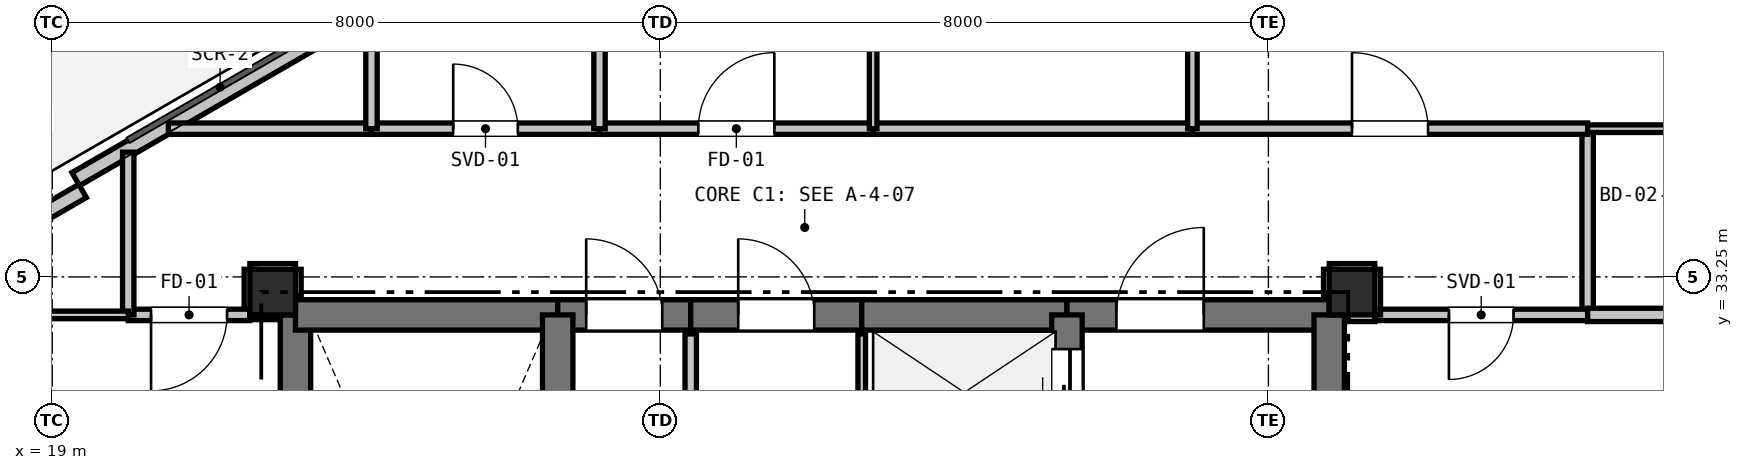
"""IFC4 building model, lengths in metres.
Left out: names, types, materials, properties, quantities, classifications, styles, units other than length and angle.
Written with IfcOpenShell. Run it as: python <this file> out.ifc"""

import sys

from ifc_helpers import new_model, si_unit, direction, frame, frame_2d, origin, origin_2d, place, context, subcontext, project, spatial, rectangle, extrude, element, fill, save


model = new_model("IFC4")
c1 = context("Model", 3, precision=1e-05, world=origin(), true_north=direction((0.0, 1.0)))
c2 = subcontext(c1, "Body", "Model", "MODEL_VIEW")
j1 = project(units=[si_unit("LENGTHUNIT", "METRE"), si_unit("PLANEANGLEUNIT", "RADIAN")], contexts=[c1])
p1 = place(None, origin())
s1 = spatial("IfcSite", under=j1, at=p1, CompositionType="ELEMENT")
p2 = place(p1, origin())
s2 = spatial("IfcBuilding", under=s1, at=p2, CompositionType="ELEMENT")
p3 = place(p2, frame((0.0, 0.0, 211.8)))
s3 = spatial("IfcBuildingStorey", under=s2, at=p3, CompositionType="ELEMENT", Elevation=211.8)
for number, where, z_axis, x_axis in (
    (1, (21.9, 33.05, 0.0), (0.0, 0.0, 1.0), (1.0, 0.0, 0.0)),
    (2, (36.1, 33.05, 0.0), (0.0, 0.0, 1.0), (1.0, 0.0, 0.0)),
):
    element("IfcColumn", number, at=place(p3, frame(where, z_axis=z_axis, x_axis=x_axis)), inside=s3, PredefinedType="COLUMN", context=c2, shape_type="SweptSolid", body=[
        extrude(rectangle(XDim=0.6, YDim=0.6, at=origin_2d()), origin(), (0.0, 0.0, 1.0), 3.3),
    ])
p4 = place(p3, frame((19.309, 34.536, 0.0), z_axis=(0.0, 0.0, 1.0), x_axis=(0.866020680503, 0.500008180874, 0.0)))
e3 = element("IfcWall", 3, at=p4, inside=s3, PredefinedType="PARAPET", context=c2, shape_type="SweptSolid", body=[
    extrude(rectangle(XDim=8.999, YDim=0.2, at=frame_2d((4.5, 0.0))), origin(), (0.0, 0.0, 1.0), 0.2),
])
p5 = place(p3, frame((17.927, 33.53, 0.0), z_axis=(0.0, 0.0, 1.0), x_axis=(0.86605165483, 0.499954529098, 0.0)))
e4 = element("IfcWall", 4, at=p5, inside=s3, PredefinedType="PARAPET", context=c2, shape_type="SweptSolid", body=[
    extrude(rectangle(XDim=1.7, YDim=0.2, at=frame_2d((0.85, 0.0))), origin(), (0.0, 0.0, 1.0), 2.69),
])
p6 = place(p3, frame((22.2, 25.4, 0.0), z_axis=(0.0, 0.0, 1.0), x_axis=(0.0, 1.0, 0.0)))
e5 = element("IfcWall", 5, at=p6, inside=s3, PredefinedType="SHEAR", context=c2, shape_type="SweptSolid", body=[
    extrude(rectangle(XDim=7.35, YDim=0.4, at=frame_2d((3.675, 0.0))), origin(), (0.0, 0.0, 1.0), 3.07),
])
p7 = place(p3, frame((22.2, 32.75, 0.0), z_axis=(0.0, 0.0, 1.0), x_axis=(1.0, 0.0, 0.0)))
e6 = element("IfcWall", 6, at=p7, inside=s3, PredefinedType="SHEAR", context=c2, shape_type="SweptSolid", body=[
    extrude(rectangle(XDim=3.45, YDim=0.4, at=frame_2d((1.725, 0.0))), origin(), (0.0, 0.0, 1.0), 3.07),
])
p8 = place(p3, frame((25.65, 32.75, 0.0), z_axis=(0.0, 0.0, 1.0), x_axis=(1.0, 0.0, 0.0)))
e7 = element("IfcWall", 7, at=p8, inside=s3, PredefinedType="SHEAR", context=c2, shape_type="SweptSolid", body=[
    extrude(rectangle(XDim=1.75, YDim=0.4, at=frame_2d((0.875, 0.0))), origin(), (0.0, 0.0, 1.0), 3.07),
])
p9 = place(p8, frame((0.375, 0.0, 0.0)))
e8 = element("IfcOpeningElement", 8, at=p9, cuts=e7, PredefinedType="OPENING", context=c2, shape_type="SweptSolid", body=[
    extrude(rectangle(XDim=1.0, YDim=2.15, at=frame_2d((0.5, 1.075))), frame((0.0, 0.21, 0.0), z_axis=(0.0, -1.0, 0.0), x_axis=(1.0, 0.0, 0.0)), (0.0, 0.0, 1.0), 0.42),
])
p10 = place(p3, frame((27.4, 32.75, 0.0), z_axis=(0.0, 0.0, 1.0), x_axis=(1.0, 0.0, 0.0)))
e9 = element("IfcWall", 9, at=p10, inside=s3, PredefinedType="SHEAR", context=c2, shape_type="SweptSolid", body=[
    extrude(rectangle(XDim=2.25, YDim=0.4, at=frame_2d((1.125, 0.0))), origin(), (0.0, 0.0, 1.0), 3.07),
])
p11 = place(p10, frame((0.625, 0.0, 0.0)))
e10 = element("IfcOpeningElement", 10, at=p11, cuts=e9, PredefinedType="OPENING", context=c2, shape_type="SweptSolid", body=[
    extrude(rectangle(XDim=1.0, YDim=2.15, at=frame_2d((0.5, 1.075))), frame((0.0, 0.21, 0.0), z_axis=(0.0, -1.0, 0.0), x_axis=(1.0, 0.0, 0.0)), (0.0, 0.0, 1.0), 0.42),
])
p12 = place(p3, frame((29.65, 32.75, 0.0), z_axis=(0.0, 0.0, 1.0), x_axis=(1.0, 0.0, 0.0)))
e11 = element("IfcWall", 11, at=p12, inside=s3, PredefinedType="SHEAR", context=c2, shape_type="SweptSolid", body=[
    extrude(rectangle(XDim=2.7, YDim=0.4, at=frame_2d((1.35, 0.0))), origin(), (0.0, 0.0, 1.0), 3.07),
])
p13 = place(p3, frame((32.35, 32.75, 0.0), z_axis=(0.0, 0.0, 1.0), x_axis=(1.0, 0.0, 0.0)))
e12 = element("IfcWall", 12, at=p13, inside=s3, PredefinedType="SHEAR", context=c2, shape_type="SweptSolid", body=[
    extrude(rectangle(XDim=3.45, YDim=0.4, at=frame_2d((1.725, 0.0))), origin(), (0.0, 0.0, 1.0), 3.07),
])
p14 = place(p13, frame((0.65, 0.0, 0.0)))
e13 = element("IfcOpeningElement", 13, at=p14, cuts=e12, PredefinedType="OPENING", context=c2, shape_type="SweptSolid", body=[
    extrude(rectangle(XDim=1.15, YDim=2.15, at=frame_2d((0.575, 1.075))), frame((0.0, 0.21, 0.0), z_axis=(0.0, -1.0, 0.0), x_axis=(1.0, 0.0, 0.0)), (0.0, 0.0, 1.0), 0.42),
])
p15 = place(p3, frame((35.8, 32.75, 0.0), z_axis=(0.0, 0.0, 1.0), x_axis=(0.0, -1.0, 0.0)))
e14 = element("IfcWall", 14, at=p15, inside=s3, PredefinedType="SHEAR", context=c2, shape_type="SweptSolid", body=[
    extrude(rectangle(XDim=4.65, YDim=0.4, at=frame_2d((2.325, 0.0))), origin(), (0.0, 0.0, 1.0), 3.07),
])
p16 = place(p3, frame((25.65, 27.95, 0.0), z_axis=(0.0, 0.0, 1.0), x_axis=(0.0, 1.0, 0.0)))
e15 = element("IfcWall", 15, at=p16, inside=s3, PredefinedType="SHEAR", context=c2, shape_type="SweptSolid", body=[
    extrude(rectangle(XDim=4.8, YDim=0.4, at=frame_2d((2.4, 0.0))), origin(), (0.0, 0.0, 1.0), 3.07),
])
p17 = place(p3, frame((32.35, 30.75, 0.0), z_axis=(0.0, 0.0, 1.0), x_axis=(0.0, 1.0, 0.0)))
e16 = element("IfcWall", 16, at=p17, inside=s3, PredefinedType="SHEAR", context=c2, shape_type="SweptSolid", body=[
    extrude(rectangle(XDim=2.0, YDim=0.4, at=frame_2d((1.0, 0.0))), origin(), (0.0, 0.0, 1.0), 3.07),
])
p18 = place(p17, frame((0.45, 0.0, 0.0)))
e17 = element("IfcOpeningElement", 17, at=p18, cuts=e16, PredefinedType="OPENING", context=c2, shape_type="SweptSolid", body=[
    extrude(rectangle(XDim=1.1, YDim=2.15, at=frame_2d((0.55, 1.075))), frame((0.0, 0.21, 0.0), z_axis=(0.0, -1.0, 0.0), x_axis=(1.0, 0.0, 0.0)), (0.0, 0.0, 1.0), 0.42),
])
p19 = place(p3, frame((29.65, 30.3, 0.0), z_axis=(0.0, 0.0, 1.0), x_axis=(0.0, 1.0, 0.0)))
e18 = element("IfcWall", 18, at=p19, inside=s3, PredefinedType="PARTITIONING", context=c2, shape_type="SweptSolid", body=[
    extrude(rectangle(XDim=2.2, YDim=0.1, at=frame_2d((1.1, 0.0))), origin(), (0.0, 0.0, 1.0), 3.07),
])
p20 = place(p3, frame((27.4, 32.5, 0.0), z_axis=(0.0, 0.0, 1.0), x_axis=(0.0, -1.0, 0.0)))
e19 = element("IfcWall", 19, at=p20, inside=s3, PredefinedType="PARTITIONING", context=c2, shape_type="SweptSolid", body=[
    extrude(rectangle(XDim=4.55, YDim=0.15, at=frame_2d((2.275, 0.0))), origin(), (0.0, 0.0, 1.0), 3.07),
])
p21 = place(p20, frame((1.775, 0.0, 0.0)))
e20 = element("IfcOpeningElement", 20, at=p21, cuts=e19, PredefinedType="OPENING", context=c2, shape_type="SweptSolid", body=[
    extrude(rectangle(XDim=1.0, YDim=2.15, at=frame_2d((0.5, 1.075))), frame((0.0, 0.085, 0.0), z_axis=(0.0, -1.0, 0.0), x_axis=(1.0, 0.0, 0.0)), (0.0, 0.0, 1.0), 0.17),
])
p22 = place(p3, frame((39.2, 35.2, 0.0), z_axis=(0.0, 0.0, 1.0), x_axis=(0.0, -1.0, 0.0)))
e21 = element("IfcWall", 21, at=p22, inside=s3, PredefinedType="PARTITIONING", context=c2, shape_type="SweptSolid", body=[
    extrude(rectangle(XDim=2.45, YDim=0.15, at=frame_2d((1.225, 0.0))), origin(), (0.0, 0.0, 1.0), 3.07),
])
p23 = place(p3, frame((39.2, 32.75, 0.0), z_axis=(0.0, 0.0, 1.0), x_axis=(-1.0, 0.0, 0.0)))
e22 = element("IfcWall", 22, at=p23, inside=s3, PredefinedType="PARTITIONING", context=c2, shape_type="SweptSolid", body=[
    extrude(rectangle(XDim=2.8, YDim=0.15, at=frame_2d((1.4, 0.0))), origin(), (0.0, 0.0, 1.0), 3.07),
])
p24 = place(p23, frame((0.975, 0.0, 0.0)))
e23 = element("IfcOpeningElement", 23, at=p24, cuts=e22, PredefinedType="OPENING", context=c2, shape_type="SweptSolid", body=[
    extrude(rectangle(XDim=0.85, YDim=2.1, at=frame_2d((0.425, 1.05))), frame((0.0, 0.085, 0.0), z_axis=(0.0, -1.0, 0.0), x_axis=(1.0, 0.0, 0.0)), (0.0, 0.0, 1.0), 0.17),
])
p25 = place(p3, frame((36.4, 32.75, 0.0), z_axis=(0.0, 0.0, 1.0), x_axis=(0.0, 1.0, 0.0)))
e24 = element("IfcWall", 24, at=p25, inside=s3, PredefinedType="PARTITIONING", context=c2, shape_type="SweptSolid", body=[
    extrude(rectangle(XDim=0.6, YDim=0.15, at=frame_2d((0.3, 0.0))), origin(), (0.0, 0.0, 1.0), 2.518),
])
p26 = place(p3, frame((36.4, 33.35, 0.0), z_axis=(0.0, 0.0, 1.0), x_axis=(-1.0, 0.0, 0.0)))
e25 = element("IfcWall", 25, at=p26, inside=s3, PredefinedType="PARTITIONING", context=c2, shape_type="SweptSolid", body=[
    extrude(rectangle(XDim=0.6, YDim=0.15, at=frame_2d((0.3, 0.0))), origin(), (0.0, 0.0, 1.0), 2.518),
])
for number, where, z_axis, x_axis in (
    (26, (35.8, 33.35, 0.0), (0.0, 0.0, 1.0), (0.0, -1.0, 0.0)),
    (27, (22.2, 33.0, 0.0), (0.0, 0.0, 1.0), (0.0, 1.0, 0.0)),
):
    element("IfcWall", number, at=place(p3, frame(where, z_axis=z_axis, x_axis=x_axis)), inside=s3, PredefinedType="PARTITIONING", context=c2, shape_type="SweptSolid", body=[
        extrude(rectangle(XDim=0.35, YDim=0.15, at=frame_2d((0.175, 0.0))), origin(), (0.0, 0.0, 1.0), 2.595),
    ])
p27 = place(p3, frame((22.2, 33.35, 0.0), z_axis=(0.0, 0.0, 1.0), x_axis=(-1.0, 0.0, 0.0)))
e28 = element("IfcWall", 28, at=p27, inside=s3, PredefinedType="PARTITIONING", context=c2, shape_type="SweptSolid", body=[
    extrude(rectangle(XDim=0.6, YDim=0.15, at=frame_2d((0.3, 0.0))), origin(), (0.0, 0.0, 1.0), 3.07),
])
p28 = place(p3, frame((21.6, 33.35, 0.0), z_axis=(0.0, 0.0, 1.0), x_axis=(0.0, -1.0, 0.0)))
e29 = element("IfcWall", 29, at=p28, inside=s3, PredefinedType="PARTITIONING", context=c2, shape_type="SweptSolid", body=[
    extrude(rectangle(XDim=0.6, YDim=0.15, at=frame_2d((0.3, 0.0))), origin(), (0.0, 0.0, 1.0), 2.518),
])
p29 = place(p3, frame((21.6, 32.75, 0.0), z_axis=(0.0, 0.0, 1.0), x_axis=(-1.0, 0.0, 0.0)))
e30 = element("IfcWall", 30, at=p29, inside=s3, PredefinedType="PARTITIONING", context=c2, shape_type="SweptSolid", body=[
    extrude(rectangle(XDim=1.6, YDim=0.15, at=frame_2d((0.8, 0.0))), origin(), (0.0, 0.0, 1.0), 2.518),
])
p30 = place(p29, frame((0.3, 0.0, 0.0)))
e31 = element("IfcOpeningElement", 31, at=p30, cuts=e30, PredefinedType="OPENING", context=c2, shape_type="SweptSolid", body=[
    extrude(rectangle(XDim=1.0, YDim=2.15, at=frame_2d((0.5, 1.075))), frame((0.0, 0.085, 0.0), z_axis=(0.0, -1.0, 0.0), x_axis=(1.0, 0.0, 0.0)), (0.0, 0.0, 1.0), 0.17),
])
p31 = place(p3, frame((20.0, 32.75, 0.0), z_axis=(0.0, 0.0, 1.0), x_axis=(0.0, 1.0, 0.0)))
e32 = element("IfcWall", 32, at=p31, inside=s3, PredefinedType="PARTITIONING", context=c2, shape_type="SweptSolid", body=[
    extrude(rectangle(XDim=2.141, YDim=0.15, at=frame_2d((1.071, 0.0))), origin(), (0.0, 0.0, 1.0), 2.365),
])
p32 = place(p3, frame((20.528, 35.2, 0.0), z_axis=(0.0, 0.0, 1.0), x_axis=(1.0, 0.0, 0.0)))
e33 = element("IfcWall", 33, at=p32, inside=s3, PredefinedType="PARTITIONING", context=c2, shape_type="SweptSolid", body=[
    extrude(rectangle(XDim=2.672, YDim=0.15, at=frame_2d((1.336, 0.0))), origin(), (0.0, 0.0, 1.0), 2.365),
])
p33 = place(p3, frame((23.2, 35.2, 0.0), z_axis=(0.0, 0.0, 1.0), x_axis=(1.0, 0.0, 0.0)))
e34 = element("IfcWall", 34, at=p33, inside=s3, PredefinedType="PARTITIONING", context=c2, shape_type="SweptSolid", body=[
    extrude(rectangle(XDim=3.0, YDim=0.15, at=frame_2d((1.5, 0.0))), origin(), (0.0, 0.0, 1.0), 3.07),
])
p34 = place(p33, frame((1.075, 0.0, 0.0)))
e35 = element("IfcOpeningElement", 35, at=p34, cuts=e34, PredefinedType="OPENING", context=c2, shape_type="SweptSolid", body=[
    extrude(rectangle(XDim=0.85, YDim=2.1, at=frame_2d((0.425, 1.05))), frame((0.0, 0.085, 0.0), z_axis=(0.0, -1.0, 0.0), x_axis=(1.0, 0.0, 0.0)), (0.0, 0.0, 1.0), 0.17),
])
p35 = place(p3, frame((26.2, 35.2, 0.0), z_axis=(0.0, 0.0, 1.0), x_axis=(1.0, 0.0, 0.0)))
e36 = element("IfcWall", 36, at=p35, inside=s3, PredefinedType="PARTITIONING", context=c2, shape_type="SweptSolid", body=[
    extrude(rectangle(XDim=3.6, YDim=0.15, at=frame_2d((1.8, 0.0))), origin(), (0.0, 0.0, 1.0), 3.07),
])
p36 = place(p35, frame((1.3, 0.0, 0.0)))
e37 = element("IfcOpeningElement", 37, at=p36, cuts=e36, PredefinedType="OPENING", context=c2, shape_type="SweptSolid", body=[
    extrude(rectangle(XDim=1.0, YDim=2.15, at=frame_2d((0.5, 1.075))), frame((0.0, 0.085, 0.0), z_axis=(0.0, -1.0, 0.0), x_axis=(1.0, 0.0, 0.0)), (0.0, 0.0, 1.0), 0.17),
])
p37 = place(p3, frame((29.8, 35.2, 0.0), z_axis=(0.0, 0.0, 1.0), x_axis=(1.0, 0.0, 0.0)))
e38 = element("IfcWall", 38, at=p37, inside=s3, PredefinedType="PARTITIONING", context=c2, shape_type="SweptSolid", body=[
    extrude(rectangle(XDim=4.2, YDim=0.15, at=frame_2d((2.1, 0.0))), origin(), (0.0, 0.0, 1.0), 3.07),
])
p38 = place(p3, frame((34.0, 35.2, 0.0), z_axis=(0.0, 0.0, 1.0), x_axis=(1.0, 0.0, 0.0)))
e39 = element("IfcWall", 39, at=p38, inside=s3, PredefinedType="PARTITIONING", context=c2, shape_type="SweptSolid", body=[
    extrude(rectangle(XDim=5.2, YDim=0.15, at=frame_2d((2.6, 0.0))), origin(), (0.0, 0.0, 1.0), 2.518),
])
p39 = place(p38, frame((2.1, 0.0, 0.0)))
e40 = element("IfcOpeningElement", 40, at=p39, cuts=e39, PredefinedType="OPENING", context=c2, shape_type="SweptSolid", body=[
    extrude(rectangle(XDim=1.0, YDim=2.15, at=frame_2d((0.5, 1.075))), frame((0.0, 0.085, 0.0), z_axis=(0.0, -1.0, 0.0), x_axis=(1.0, 0.0, 0.0)), (0.0, 0.0, 1.0), 0.17),
])
p40 = place(p3, frame((36.05, 32.75, 0.0), z_axis=(0.0, 0.0, 1.0), x_axis=(1.0, 0.0, 0.0)))
e41 = element("IfcWall", 41, at=p40, inside=s3, PredefinedType="PLUMBINGWALL", context=c2, shape_type="SweptSolid", body=[
    extrude(rectangle(XDim=0.35, YDim=0.175, at=frame_2d((0.175, 0.0))), origin(), (0.0, 0.0, 1.0), 2.595),
])
p41 = place(p3, frame((39.2, 32.75, 0.0), z_axis=(0.0, 0.0, 1.0), x_axis=(1.0, 0.0, 0.0)))
e42 = element("IfcWall", 42, at=p41, inside=s3, PredefinedType="PLUMBINGWALL", context=c2, shape_type="SweptSolid", body=[
    extrude(rectangle(XDim=1.084, YDim=0.175, at=frame_2d((0.542, 0.0))), origin(), (0.0, 0.0, 1.0), 2.365),
])
p42 = place(p3, frame((16.464, 32.75, 0.0), z_axis=(0.0, 0.0, 1.0), x_axis=(1.0, 0.0, 0.0)))
e43 = element("IfcWall", 43, at=p42, inside=s3, PredefinedType="PARTITIONING", context=c2, shape_type="SweptSolid", body=[
    extrude(rectangle(XDim=3.536, YDim=0.1, at=frame_2d((1.768, 0.0))), origin(), (0.0, 0.0, 1.0), 2.365),
])
p43 = place(p3, frame((21.6, 32.75, 0.0), z_axis=(0.0, 0.0, 1.0), x_axis=(1.0, 0.0, 0.0)))
e44 = element("IfcWall", 44, at=p43, inside=s3, PredefinedType="PARTITIONING", context=c2, shape_type="SweptSolid", body=[
    extrude(rectangle(XDim=0.35, YDim=0.125, at=frame_2d((0.175, 0.0))), origin(), (0.0, 0.0, 1.0), 2.595),
])
p44 = place(p3, frame((26.2, 37.5, 0.0), z_axis=(0.0, 0.0, 1.0), x_axis=(0.0, -1.0, 0.0)))
e45 = element("IfcWall", 45, at=p44, inside=s3, PredefinedType="PARTITIONING", context=c2, shape_type="SweptSolid", body=[
    extrude(rectangle(XDim=2.3, YDim=0.15, at=frame_2d((1.15, 0.0))), origin(), (0.0, 0.0, 1.0), 3.07),
])
p45 = place(p3, frame((23.2, 35.2, 0.0), z_axis=(0.0, 0.0, 1.0), x_axis=(0.0, 1.0, 0.0)))
e46 = element("IfcWall", 46, at=p45, inside=s3, PredefinedType="PARTITIONING", context=c2, shape_type="SweptSolid", body=[
    extrude(rectangle(XDim=1.539, YDim=0.15, at=frame_2d((0.769, 0.0))), origin(), (0.0, 0.0, 1.0), 2.365),
])
p46 = place(p3, frame((29.8, 37.5, 0.0), z_axis=(0.0, 0.0, 1.0), x_axis=(0.0, -1.0, 0.0)))
e47 = element("IfcWall", 47, at=p46, inside=s3, PredefinedType="PARTITIONING", context=c2, shape_type="SweptSolid", body=[
    extrude(rectangle(XDim=2.3, YDim=0.1, at=frame_2d((1.15, 0.0))), origin(), (0.0, 0.0, 1.0), 3.07),
])
p47 = place(p3, frame((40.452, 35.2, 0.0), z_axis=(0.0, 0.0, 1.0), x_axis=(-1.0, 0.0, 0.0)))
e48 = element("IfcWall", 48, at=p47, inside=s3, PredefinedType="PARTITIONING", context=c2, shape_type="SweptSolid", body=[
    extrude(rectangle(XDim=1.252, YDim=0.1, at=frame_2d((0.626, 0.0))), origin(), (0.0, 0.0, 1.0), 2.365),
])
p48 = place(p3, frame((34.0, 35.2, 0.0), z_axis=(0.0, 0.0, 1.0), x_axis=(0.0, 1.0, 0.0)))
e49 = element("IfcWall", 49, at=p48, inside=s3, PredefinedType="PARTITIONING", context=c2, shape_type="SweptSolid", body=[
    extrude(rectangle(XDim=2.3, YDim=0.125, at=frame_2d((1.15, 0.0))), origin(), (0.0, 0.0, 1.0), 3.07),
])
p49 = place(p9, origin())
e50 = element("IfcDoor", 50, at=p49, inside=s3, OperationType="SINGLE_SWING_LEFT", PredefinedType="DOOR", context=c2, shape_type="SweptSolid", body=[
    extrude(rectangle(XDim=1.0, YDim=2.15, at=frame_2d((0.5, 1.075))), frame((0.0, 0.025, 0.0), z_axis=(0.0, -1.0, 0.0), x_axis=(1.0, 0.0, 0.0)), (0.0, 0.0, 1.0), 0.05),
])
fill(e8, e50)
p50 = place(p18, origin())
e51 = element("IfcDoor", 51, at=p50, inside=s3, OperationType="SLIDING_TO_LEFT", PredefinedType="DOOR", context=c2, shape_type="SweptSolid", body=[
    extrude(rectangle(XDim=1.1, YDim=2.15, at=frame_2d((0.55, 1.075))), frame((0.0, 0.025, 0.0), z_axis=(0.0, -1.0, 0.0), x_axis=(1.0, 0.0, 0.0)), (0.0, 0.0, 1.0), 0.05),
])
fill(e17, e51)
p51 = place(p14, origin())
e52 = element("IfcDoor", 52, at=p51, inside=s3, OperationType="SINGLE_SWING_RIGHT", PredefinedType="DOOR", context=c2, shape_type="SweptSolid", body=[
    extrude(rectangle(XDim=1.15, YDim=2.15, at=frame_2d((0.575, 1.075))), frame((0.0, 0.025, 0.0), z_axis=(0.0, -1.0, 0.0), x_axis=(1.0, 0.0, 0.0)), (0.0, 0.0, 1.0), 0.05),
])
fill(e13, e52)
p52 = place(p24, origin())
e53 = element("IfcDoor", 53, at=p52, inside=s3, OperationType="SINGLE_SWING_RIGHT", PredefinedType="DOOR", context=c2, shape_type="SweptSolid", body=[
    extrude(rectangle(XDim=0.85, YDim=2.1, at=frame_2d((0.425, 1.05))), frame((0.0, 0.025, 0.0), z_axis=(0.0, -1.0, 0.0), x_axis=(1.0, 0.0, 0.0)), (0.0, 0.0, 1.0), 0.05),
])
fill(e23, e53)
p53 = place(p11, origin())
e54 = element("IfcDoor", 54, at=p53, inside=s3, OperationType="SINGLE_SWING_LEFT", PredefinedType="DOOR", context=c2, shape_type="SweptSolid", body=[
    extrude(rectangle(XDim=1.0, YDim=2.15, at=frame_2d((0.5, 1.075))), frame((0.0, 0.025, 0.0), z_axis=(0.0, -1.0, 0.0), x_axis=(1.0, 0.0, 0.0)), (0.0, 0.0, 1.0), 0.05),
])
fill(e10, e54)
p54 = place(p30, origin())
e55 = element("IfcDoor", 55, at=p54, inside=s3, OperationType="SINGLE_SWING_RIGHT", PredefinedType="DOOR", context=c2, shape_type="SweptSolid", body=[
    extrude(rectangle(XDim=1.0, YDim=2.15, at=frame_2d((0.5, 1.075))), frame((0.0, 0.025, 0.0), z_axis=(0.0, -1.0, 0.0), x_axis=(1.0, 0.0, 0.0)), (0.0, 0.0, 1.0), 0.05),
])
fill(e31, e55)
p55 = place(p34, origin())
e56 = element("IfcDoor", 56, at=p55, inside=s3, OperationType="SINGLE_SWING_LEFT", PredefinedType="DOOR", context=c2, shape_type="SweptSolid", body=[
    extrude(rectangle(XDim=0.85, YDim=2.1, at=frame_2d((0.425, 1.05))), frame((0.0, 0.025, 0.0), z_axis=(0.0, -1.0, 0.0), x_axis=(1.0, 0.0, 0.0)), (0.0, 0.0, 1.0), 0.05),
])
fill(e35, e56)
p56 = place(p36, origin())
e57 = element("IfcDoor", 57, at=p56, inside=s3, OperationType="SINGLE_SWING_RIGHT", PredefinedType="DOOR", context=c2, shape_type="SweptSolid", body=[
    extrude(rectangle(XDim=1.0, YDim=2.15, at=frame_2d((0.5, 1.075))), frame((0.0, 0.025, 0.0), z_axis=(0.0, -1.0, 0.0), x_axis=(1.0, 0.0, 0.0)), (0.0, 0.0, 1.0), 0.05),
])
fill(e37, e57)
p57 = place(p39, origin())
e58 = element("IfcDoor", 58, at=p57, inside=s3, OperationType="SINGLE_SWING_LEFT", PredefinedType="DOOR", context=c2, shape_type="SweptSolid", body=[
    extrude(rectangle(XDim=1.0, YDim=2.15, at=frame_2d((0.5, 1.075))), frame((0.0, 0.025, 0.0), z_axis=(0.0, -1.0, 0.0), x_axis=(1.0, 0.0, 0.0)), (0.0, 0.0, 1.0), 0.05),
])
fill(e40, e58)
save(model, sys.argv[1])
